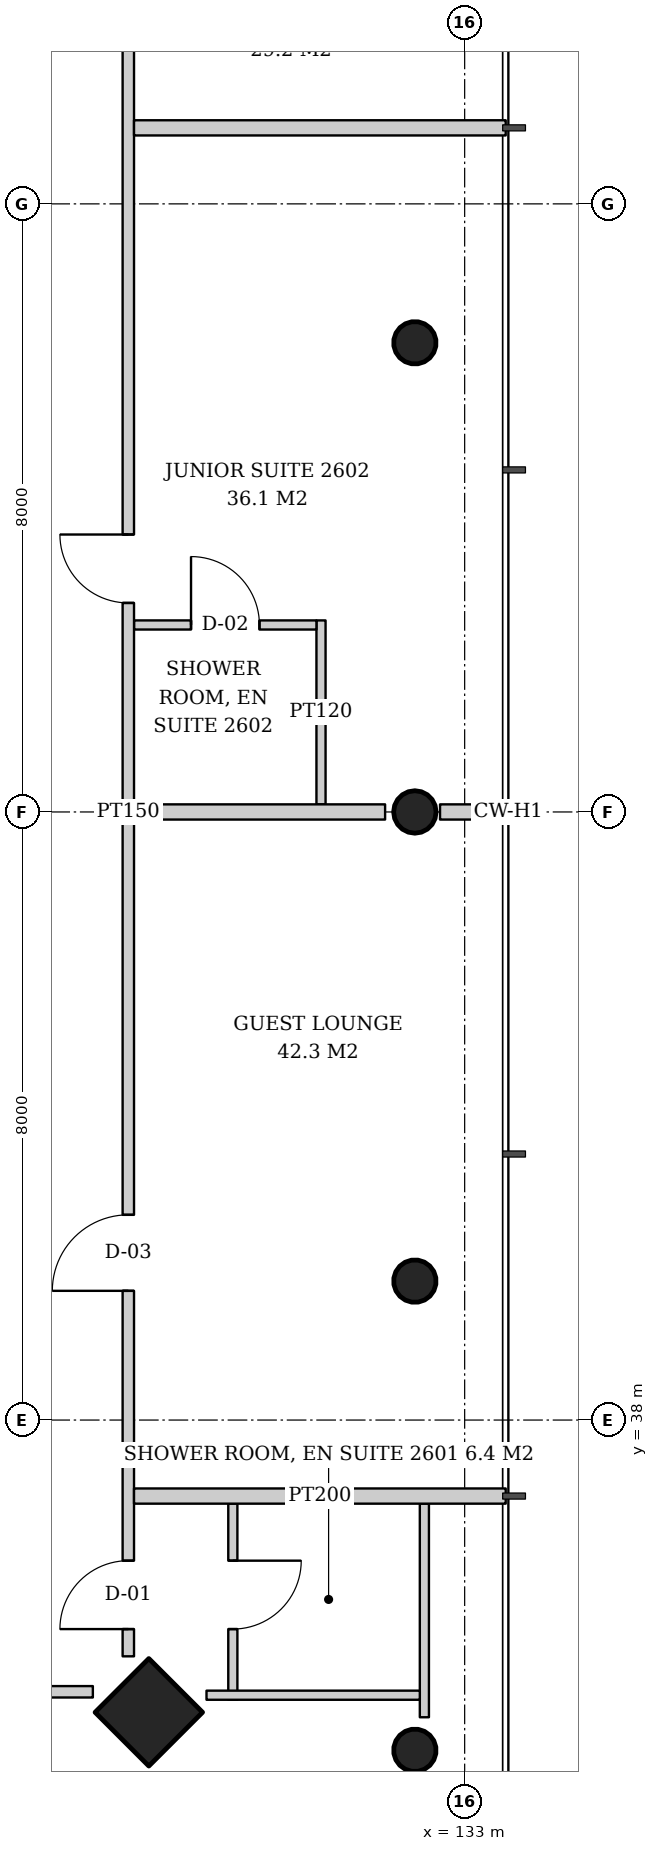
"""IFC4 building model, lengths in metres.
Left out: names, types, materials, properties, quantities, classifications, styles, units other than length and angle.
Written with IfcOpenShell. Run it as: python <this file> out.ifc"""

import sys

from ifc_helpers import new_model, si_unit, direction, frame, frame_2d, origin, origin_2d, place, context, subcontext, project, spatial, rectangle, hollow_circle, extrude, element, fill, save


model = new_model("IFC4")
c1 = context("Model", 3, precision=1e-05, world=origin(), true_north=direction((0.0, 1.0)))
c2 = subcontext(c1, "Body", "Model", "MODEL_VIEW")
j1 = project(units=[si_unit("LENGTHUNIT", "METRE"), si_unit("PLANEANGLEUNIT", "RADIAN")], contexts=[c1])
p1 = place(None, origin())
s1 = spatial("IfcSite", under=j1, at=p1, CompositionType="ELEMENT")
p2 = place(p1, origin())
s2 = spatial("IfcBuilding", under=s1, at=p2, CompositionType="ELEMENT")
p3 = place(p2, frame((0.0, 0.0, 104.6)))
s3 = spatial("IfcBuildingStorey", under=s2, at=p3, CompositionType="ELEMENT", Elevation=104.6)
p4 = place(p3, frame((132.396, 33.604, 0.0), z_axis=(-0.043032401563, 0.043032401563, 0.998146494675), x_axis=(-0.707106781187, -0.707106781187, 0.0)))
e1 = element("IfcColumn", 1, at=p4, inside=s3, PredefinedType="COLUMN", context=c2, shape_type="SweptSolid", body=[
    extrude(hollow_circle(Radius=0.28, WallThickness=0.02, at=origin_2d()), origin(), (0.0, 0.0, 1.0), 3.807),
])
p5 = place(p3, frame((132.396, 39.802, 0.0), z_axis=(-0.04306234503, 0.02149908433, 0.998841040313), x_axis=(-0.446680166538, -0.894693706707, 0.0)))
e2 = element("IfcColumn", 2, at=p5, inside=s3, PredefinedType="COLUMN", context=c2, shape_type="SweptSolid", body=[
    extrude(hollow_circle(Radius=0.28, WallThickness=0.02, at=origin_2d()), origin(), (0.0, 0.0, 1.0), 3.804),
])
p6 = place(p3, frame((132.396, 46.0, 0.0), z_axis=(-0.043072300418, 0.0, 0.999071957837), x_axis=(0.0, -1.0, 0.0)))
e3 = element("IfcColumn", 3, at=p6, inside=s3, PredefinedType="COLUMN", context=c2, shape_type="SweptSolid", body=[
    extrude(hollow_circle(Radius=0.28, WallThickness=0.02, at=origin_2d()), origin(), (0.0, 0.0, 1.0), 3.803),
])
p7 = place(p3, frame((132.396, 52.198, 0.0), z_axis=(-0.04306234503, -0.02149908433, 0.998841040313), x_axis=(0.446680166538, -0.894693706707, 0.0)))
e4 = element("IfcColumn", 4, at=p7, inside=s3, PredefinedType="COLUMN", context=c2, shape_type="SweptSolid", body=[
    extrude(hollow_circle(Radius=0.28, WallThickness=0.02, at=origin_2d()), origin(), (0.0, 0.0, 1.0), 3.804),
])
p8 = place(p3, frame((128.896, 34.104, 0.0), z_axis=(-0.043032401563, 0.043032401563, 0.998146494675), x_axis=(-0.707106781187, -0.707106781187, 0.0)))
e5 = element("IfcColumn", 5, at=p8, inside=s3, PredefinedType="COLUMN", context=c2, shape_type="SweptSolid", body=[
    extrude(rectangle(XDim=1.0, YDim=1.0, at=origin_2d()), origin(), (0.0, 0.0, 1.0), 3.807),
])
p9 = place(p3, frame((129.95, 36.9, 0.0), z_axis=(0.0, 0.0, 1.0), x_axis=(0.0, -1.0, 0.0)))
e6 = element("IfcWall", 6, at=p9, inside=s3, PredefinedType="PARTITIONING", context=c2, shape_type="SweptSolid", body=[
    extrude(rectangle(XDim=2.58, YDim=0.12, at=frame_2d((1.29, 0.0))), origin(), (0.0, 0.0, 1.0), 2.9),
])
p10 = place(p9, frame((0.75, 0.0, 0.0)))
e7 = element("IfcOpeningElement", 7, at=p10, cuts=e6, PredefinedType="OPENING", context=c2, shape_type="SweptSolid", body=[
    extrude(rectangle(XDim=0.9, YDim=2.1, at=frame_2d((0.45, 1.05))), frame((0.0, 0.07, 0.0), z_axis=(0.0, -1.0, 0.0), x_axis=(1.0, 0.0, 0.0)), (0.0, 0.0, 1.0), 0.14),
])
p11 = place(p3, frame((132.47, 36.9, 0.0), z_axis=(0.0, 0.0, 1.0), x_axis=(0.0, -1.0, 0.0)))
e8 = element("IfcWall", 8, at=p11, inside=s3, PredefinedType="PARTITIONING", context=c2, shape_type="SweptSolid", body=[
    extrude(rectangle(XDim=2.81, YDim=0.12, at=frame_2d((1.405, 0.0))), origin(), (0.0, 0.0, 1.0), 3.6),
])
p12 = place(p3, frame((129.604, 34.38, 0.0), z_axis=(0.0, 0.0, 1.0), x_axis=(1.0, 0.0, 0.0)))
e9 = element("IfcWall", 9, at=p12, inside=s3, PredefinedType="PARTITIONING", context=c2, shape_type="SweptSolid", body=[
    extrude(rectangle(XDim=2.806, YDim=0.12, at=frame_2d((1.403, 0.0))), origin(), (0.0, 0.0, 1.0), 3.2),
])
p13 = place(p3, frame((131.11, 46.1, 0.0), z_axis=(0.0, 0.0, 1.0), x_axis=(0.0, 1.0, 0.0)))
e10 = element("IfcWall", 10, at=p13, inside=s3, PredefinedType="PARTITIONING", context=c2, shape_type="SweptSolid", body=[
    extrude(rectangle(XDim=2.42, YDim=0.12, at=frame_2d((1.21, 0.0))), origin(), (0.0, 0.0, 1.0), 3.6),
])
p14 = place(p3, frame((128.65, 48.46, 0.0), z_axis=(0.0, 0.0, 1.0), x_axis=(1.0, 0.0, 0.0)))
e11 = element("IfcWall", 11, at=p14, inside=s3, PredefinedType="PARTITIONING", context=c2, shape_type="SweptSolid", body=[
    extrude(rectangle(XDim=2.4, YDim=0.12, at=frame_2d((1.2, 0.0))), origin(), (0.0, 0.0, 1.0), 3.6),
])
p15 = place(p14, frame((0.75, 0.0, 0.0)))
e12 = element("IfcOpeningElement", 12, at=p15, cuts=e11, PredefinedType="OPENING", context=c2, shape_type="SweptSolid", body=[
    extrude(rectangle(XDim=0.9, YDim=2.1, at=frame_2d((0.45, 1.05))), frame((0.0, 0.07, 0.0), z_axis=(0.0, -1.0, 0.0), x_axis=(1.0, 0.0, 0.0)), (0.0, 0.0, 1.0), 0.14),
])
p16 = place(p3, frame((128.575, 34.892, 0.0), z_axis=(0.0, 0.0, 1.0), x_axis=(0.0, 1.0, 0.0)))
e13 = element("IfcWall", 13, at=p16, inside=s3, PredefinedType="PARTITIONING", context=c2, shape_type="SweptSolid", body=[
    extrude(rectangle(XDim=22.217, YDim=0.15, at=frame_2d((11.108, 0.0))), origin(), (0.0, 0.0, 1.0), 2.9),
])
p17 = place(p16, frame((0.358, 0.0, 0.0)))
e14 = element("IfcOpeningElement", 14, at=p17, cuts=e13, PredefinedType="OPENING", context=c2, shape_type="SweptSolid", body=[
    extrude(rectangle(XDim=0.9, YDim=2.1, at=frame_2d((0.45, 1.05))), frame((0.0, 0.085, 0.0), z_axis=(0.0, -1.0, 0.0), x_axis=(1.0, 0.0, 0.0)), (0.0, 0.0, 1.0), 0.17),
])
p18 = place(p16, frame((4.808, 0.0, 0.0)))
e15 = element("IfcOpeningElement", 15, at=p18, cuts=e13, PredefinedType="OPENING", context=c2, shape_type="SweptSolid", body=[
    extrude(rectangle(XDim=1.0, YDim=2.1, at=frame_2d((0.5, 1.05))), frame((0.0, 0.085, 0.0), z_axis=(0.0, -1.0, 0.0), x_axis=(1.0, 0.0, 0.0)), (0.0, 0.0, 1.0), 0.17),
])
p19 = place(p16, frame((13.858, 0.0, 0.0)))
e16 = element("IfcOpeningElement", 16, at=p19, cuts=e13, PredefinedType="OPENING", context=c2, shape_type="SweptSolid", body=[
    extrude(rectangle(XDim=0.9, YDim=2.1, at=frame_2d((0.45, 1.05))), frame((0.0, 0.085, 0.0), z_axis=(0.0, -1.0, 0.0), x_axis=(1.0, 0.0, 0.0)), (0.0, 0.0, 1.0), 0.17),
])
p20 = place(p3, frame((128.65, 37.0, 0.0), z_axis=(0.0, 0.0, 1.0), x_axis=(1.0, 0.0, 0.0)))
e17 = element("IfcWall", 17, at=p20, inside=s3, PredefinedType="PARTITIONING", context=c2, shape_type="SweptSolid", body=[
    extrude(rectangle(XDim=4.89, YDim=0.2, at=frame_2d((2.445, 0.0))), origin(), (0.0, 0.0, 1.0), 2.9),
])
p21 = place(p3, frame((128.65, 46.0, 0.0), z_axis=(0.0, 0.0, 1.0), x_axis=(1.0, 0.0, 0.0)))
e18 = element("IfcWall", 18, at=p21, inside=s3, PredefinedType="PARTITIONING", context=c2, shape_type="SweptSolid", body=[
    extrude(rectangle(XDim=3.303, YDim=0.2, at=frame_2d((1.652, 0.0))), origin(), (0.0, 0.0, 1.0), 3.6),
])
p22 = place(p3, frame((132.676, 46.0, 0.0), z_axis=(0.0, 0.0, 1.0), x_axis=(1.0, 0.0, 0.0)))
e19 = element("IfcWall", 19, at=p22, inside=s3, PredefinedType="PARTITIONING", context=c2, shape_type="SweptSolid", body=[
    extrude(rectangle(XDim=0.864, YDim=0.2, at=frame_2d((0.432, 0.0))), origin(), (0.0, 0.0, 1.0), 3.6),
])
p23 = place(p3, frame((128.65, 55.0, 0.0), z_axis=(0.0, 0.0, 1.0), x_axis=(1.0, 0.0, 0.0)))
e20 = element("IfcWall", 20, at=p23, inside=s3, PredefinedType="PARTITIONING", context=c2, shape_type="SweptSolid", body=[
    extrude(rectangle(XDim=4.89, YDim=0.2, at=frame_2d((2.445, 0.0))), origin(), (0.0, 0.0, 1.0), 3.2),
])
p24 = place(p3, frame((105.892, 34.425, 0.0), z_axis=(0.0, 0.0, 1.0), x_axis=(1.0, 0.0, 0.0)))
e21 = element("IfcWall", 21, at=p24, inside=s3, PredefinedType="PARTITIONING", context=c2, shape_type="SweptSolid", body=[
    extrude(rectangle(XDim=22.217, YDim=0.15, at=frame_2d((11.108, 0.0))), origin(), (0.0, 0.0, 1.0), 2.9),
])
p25 = place(p24, frame((0.358, 0.0, 0.0)))
e22 = element("IfcOpeningElement", 22, at=p25, cuts=e21, PredefinedType="OPENING", context=c2, shape_type="SweptSolid", body=[
    extrude(rectangle(XDim=0.9, YDim=2.1, at=frame_2d((0.45, 1.05))), frame((0.0, 0.085, 0.0), z_axis=(0.0, -1.0, 0.0), x_axis=(1.0, 0.0, 0.0)), (0.0, 0.0, 1.0), 0.17),
])
p26 = place(p24, frame((4.858, 0.0, 0.0)))
e23 = element("IfcOpeningElement", 23, at=p26, cuts=e21, PredefinedType="OPENING", context=c2, shape_type="SweptSolid", body=[
    extrude(rectangle(XDim=0.9, YDim=2.1, at=frame_2d((0.45, 1.05))), frame((0.0, 0.085, 0.0), z_axis=(0.0, -1.0, 0.0), x_axis=(1.0, 0.0, 0.0)), (0.0, 0.0, 1.0), 0.17),
])
p27 = place(p24, frame((13.858, 0.0, 0.0)))
e24 = element("IfcOpeningElement", 24, at=p27, cuts=e21, PredefinedType="OPENING", context=c2, shape_type="SweptSolid", body=[
    extrude(rectangle(XDim=0.9, YDim=2.1, at=frame_2d((0.45, 1.05))), frame((0.0, 0.085, 0.0), z_axis=(0.0, -1.0, 0.0), x_axis=(1.0, 0.0, 0.0)), (0.0, 0.0, 1.0), 0.17),
])
p28 = place(p10, origin())
e25 = element("IfcDoor", 25, at=p28, inside=s3, OperationType="SINGLE_SWING_LEFT", PredefinedType="DOOR", context=c2, shape_type="SweptSolid", body=[
    extrude(rectangle(XDim=0.9, YDim=2.1, at=frame_2d((0.45, 1.05))), frame((0.0, 0.025, 0.0), z_axis=(0.0, -1.0, 0.0), x_axis=(1.0, 0.0, 0.0)), (0.0, 0.0, 1.0), 0.05),
])
fill(e7, e25)
p29 = place(p15, origin())
e26 = element("IfcDoor", 26, at=p29, inside=s3, OperationType="SINGLE_SWING_LEFT", PredefinedType="DOOR", context=c2, shape_type="SweptSolid", body=[
    extrude(rectangle(XDim=0.9, YDim=2.1, at=frame_2d((0.45, 1.05))), frame((0.0, 0.025, 0.0), z_axis=(0.0, -1.0, 0.0), x_axis=(1.0, 0.0, 0.0)), (0.0, 0.0, 1.0), 0.05),
])
fill(e12, e26)
p30 = place(p17, origin())
e27 = element("IfcDoor", 27, at=p30, inside=s3, OperationType="SINGLE_SWING_LEFT", PredefinedType="DOOR", context=c2, shape_type="SweptSolid", body=[
    extrude(rectangle(XDim=0.9, YDim=2.1, at=frame_2d((0.45, 1.05))), frame((0.0, 0.025, 0.0), z_axis=(0.0, -1.0, 0.0), x_axis=(1.0, 0.0, 0.0)), (0.0, 0.0, 1.0), 0.05),
])
fill(e14, e27)
p31 = place(p18, origin())
e28 = element("IfcDoor", 28, at=p31, inside=s3, OperationType="SINGLE_SWING_LEFT", PredefinedType="DOOR", context=c2, shape_type="SweptSolid", body=[
    extrude(rectangle(XDim=1.0, YDim=2.1, at=frame_2d((0.5, 1.05))), frame((0.0, 0.025, 0.0), z_axis=(0.0, -1.0, 0.0), x_axis=(1.0, 0.0, 0.0)), (0.0, 0.0, 1.0), 0.05),
])
fill(e15, e28)
p32 = place(p19, origin())
e29 = element("IfcDoor", 29, at=p32, inside=s3, OperationType="SINGLE_SWING_RIGHT", PredefinedType="DOOR", context=c2, shape_type="SweptSolid", body=[
    extrude(rectangle(XDim=0.9, YDim=2.1, at=frame_2d((0.45, 1.05))), frame((0.0, 0.025, 0.0), z_axis=(0.0, -1.0, 0.0), x_axis=(1.0, 0.0, 0.0)), (0.0, 0.0, 1.0), 0.05),
])
fill(e16, e29)
save(model, sys.argv[1])
